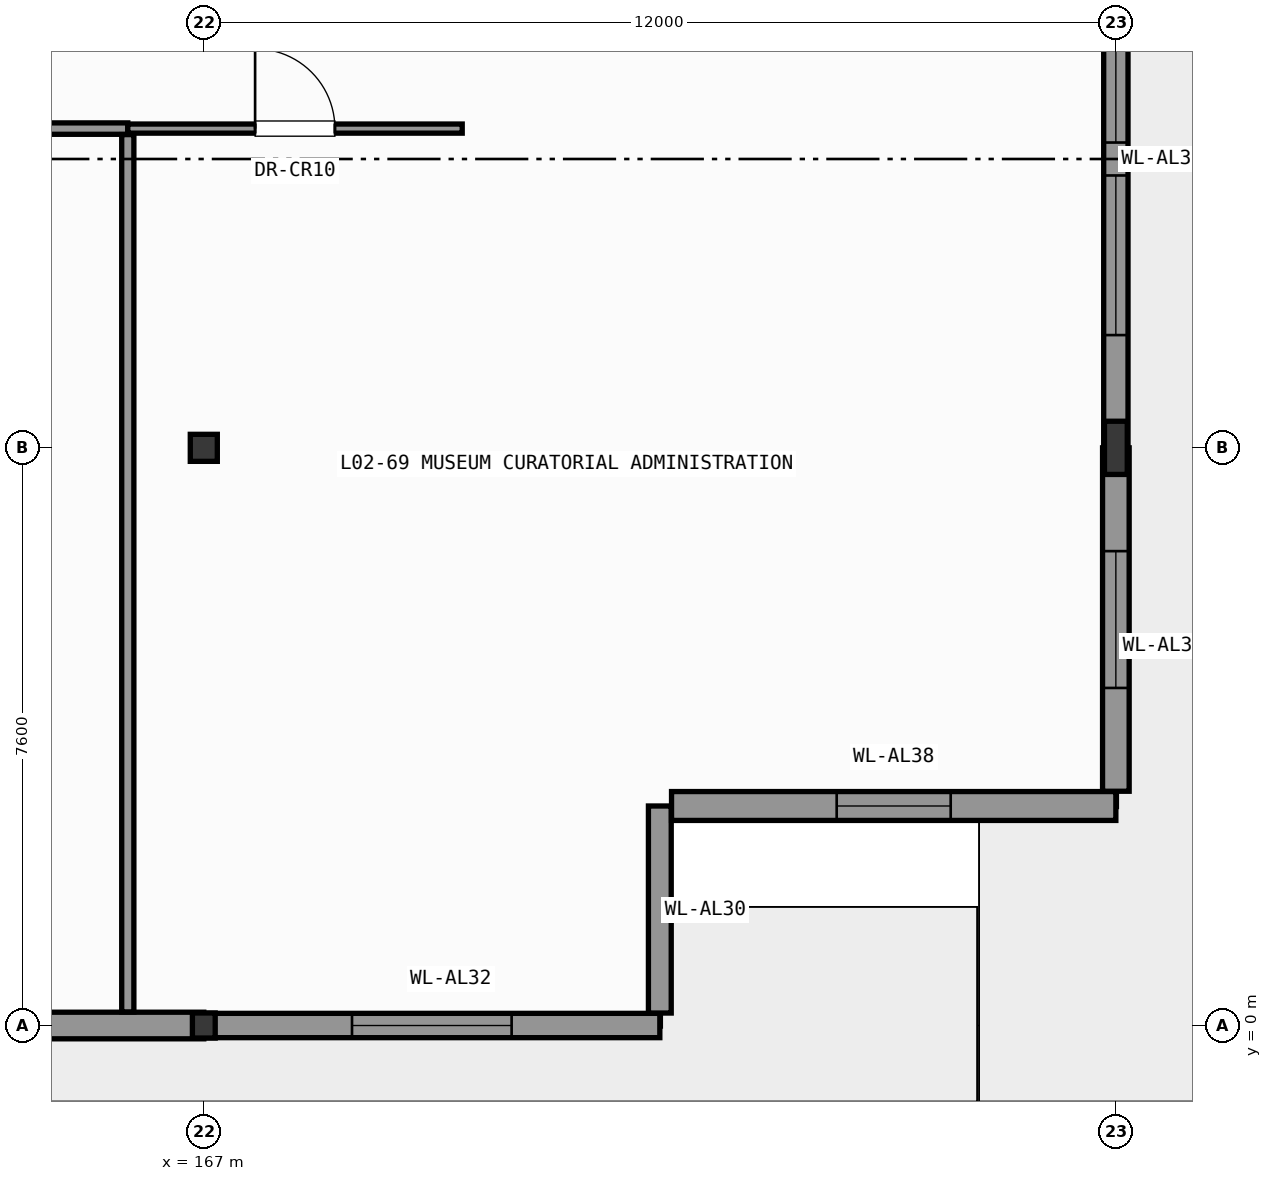
"""IFC4 building model, lengths in metres.
Left out: names, types, materials, properties, quantities, classifications, styles, units other than length and angle.
Written with IfcOpenShell. Run it as: python <this file> out.ifc"""

import sys

from ifc_helpers import new_model, si_unit, direction, frame, frame_2d, origin, origin_2d, place, context, subcontext, project, spatial, rectangle, hollow_circle, i_section, extrude, element, fill, save


model = new_model("IFC4")
c1 = context("Model", 3, precision=1e-05, world=origin(), true_north=direction((0.0, 1.0)))
c2 = subcontext(c1, "Body", "Model", "MODEL_VIEW")
j1 = project(units=[si_unit("LENGTHUNIT", "METRE"), si_unit("PLANEANGLEUNIT", "RADIAN")], contexts=[c1])
p1 = place(None, origin())
s1 = spatial("IfcSite", under=j1, at=p1, CompositionType="ELEMENT")
p2 = place(p1, origin())
s2 = spatial("IfcBuilding", under=s1, at=p2, CompositionType="ELEMENT")
p3 = place(p2, frame((0.0, 0.0, 7.8)))
s3 = spatial("IfcBuildingStorey", under=s2, at=p3, CompositionType="ELEMENT", Elevation=7.8)
p4 = place(p3, frame((167.0, 0.0, 0.0), z_axis=(0.0, 0.0, 1.0), x_axis=(1.0, 0.0, 0.0)))
e1 = element("IfcColumn", 1, at=p4, inside=s3, PredefinedType="COLUMN", context=c2, shape_type="SweptSolid", body=[
    extrude(i_section(OverallWidth=0.3, OverallDepth=0.33, WebThickness=0.01, FlangeThickness=0.017, FilletRadius=0.027, at=origin_2d()), origin(), (0.0, 0.0, 1.0), 5.4),
])
p5 = place(p3, frame((167.0, 7.6, 0.0), z_axis=(0.0, 0.0, 1.0), x_axis=(1.0, 0.0, 0.0)))
e2 = element("IfcColumn", 2, at=p5, inside=s3, PredefinedType="COLUMN", context=c2, shape_type="SweptSolid", body=[
    extrude(hollow_circle(Radius=0.178, WallThickness=0.016, at=origin_2d()), origin(), (0.0, 0.0, 1.0), 5.4),
])
p6 = place(p3, frame((179.0, 7.6, 0.0), z_axis=(0.0, 0.0, 1.0), x_axis=(1.0, 0.0, 0.0)))
e3 = element("IfcColumn", 3, at=p6, inside=s3, PredefinedType="COLUMN", context=c2, shape_type="SweptSolid", body=[
    extrude(i_section(OverallWidth=0.3, OverallDepth=0.7, WebThickness=0.017, FlangeThickness=0.032, FilletRadius=0.027, at=origin_2d()), origin(), (0.0, 0.0, 1.0), 5.4),
])
p7 = place(p3, frame((167.0, 0.0, 0.0), z_axis=(0.0, 0.0, 1.0), x_axis=(-1.0, 0.0, 0.0)))
e4 = element("IfcWall", 4, at=p7, inside=s3, PredefinedType="SOLIDWALL", context=c2, shape_type="SweptSolid", body=[
    extrude(rectangle(XDim=12.0, YDim=0.35, at=frame_2d((6.0, 0.0))), origin(), (0.0, 0.0, 1.0), 4.535),
])
p8 = place(p7, frame((3.225, 0.0, 0.95)))
e5 = element("IfcOpeningElement", 5, at=p8, cuts=e4, PredefinedType="OPENING", context=c2, shape_type="SweptSolid", body=[
    extrude(rectangle(XDim=1.55, YDim=2.1, at=frame_2d((0.775, 1.05))), frame((0.0, 0.185, 0.0), z_axis=(0.0, -1.0, 0.0), x_axis=(1.0, 0.0, 0.0)), (0.0, 0.0, 1.0), 0.37),
])
p9 = place(p7, frame((7.225, 0.0, 0.95)))
e6 = element("IfcOpeningElement", 6, at=p9, cuts=e4, PredefinedType="OPENING", context=c2, shape_type="SweptSolid", body=[
    extrude(rectangle(XDim=1.55, YDim=2.1, at=frame_2d((0.775, 1.05))), frame((0.0, 0.185, 0.0), z_axis=(0.0, -1.0, 0.0), x_axis=(1.0, 0.0, 0.0)), (0.0, 0.0, 1.0), 0.37),
])
p10 = place(p3, frame((173.0, 0.0, 0.0), z_axis=(0.0, 0.0, 1.0), x_axis=(-1.0, 0.0, 0.0)))
e7 = element("IfcWall", 7, at=p10, inside=s3, PredefinedType="SOLIDWALL", context=c2, shape_type="SweptSolid", body=[
    extrude(rectangle(XDim=6.0, YDim=0.32, at=frame_2d((3.0, 0.0))), origin(), (0.0, 0.0, 1.0), 5.15),
])
p11 = place(p10, frame((1.95, 0.0, 0.95)))
e8 = element("IfcOpeningElement", 8, at=p11, cuts=e7, PredefinedType="OPENING", context=c2, shape_type="SweptSolid", body=[
    extrude(rectangle(XDim=2.1, YDim=2.8, at=frame_2d((1.05, 1.4))), frame((0.0, 0.17, 0.0), z_axis=(0.0, -1.0, 0.0), x_axis=(1.0, 0.0, 0.0)), (0.0, 0.0, 1.0), 0.34),
])
p12 = place(p3, frame((173.0, 2.888, 0.0), z_axis=(0.0, 0.0, 1.0), x_axis=(0.0, -1.0, 0.0)))
e9 = element("IfcWall", 9, at=p12, inside=s3, PredefinedType="SOLIDWALL", context=c2, shape_type="SweptSolid", body=[
    extrude(rectangle(XDim=2.724, YDim=0.3, at=frame_2d((1.362, 0.0))), origin(), (0.0, 0.0, 1.0), 5.15),
])
p13 = place(p3, frame((179.0, 2.888, 0.0), z_axis=(0.0, 0.0, 1.0), x_axis=(-1.0, 0.0, 0.0)))
e10 = element("IfcWall", 10, at=p13, inside=s3, PredefinedType="SOLIDWALL", context=c2, shape_type="SweptSolid", body=[
    extrude(rectangle(XDim=5.846, YDim=0.38, at=frame_2d((2.923, 0.0))), origin(), (0.0, 0.0, 1.0), 5.15),
])
p14 = place(p13, frame((2.173, 0.0, 0.95)))
e11 = element("IfcOpeningElement", 11, at=p14, cuts=e10, PredefinedType="OPENING", context=c2, shape_type="SweptSolid", body=[
    extrude(rectangle(XDim=1.5, YDim=2.4, at=frame_2d((0.75, 1.2))), frame((0.0, 0.2, 0.0), z_axis=(0.0, -1.0, 0.0), x_axis=(1.0, 0.0, 0.0)), (0.0, 0.0, 1.0), 0.4),
])
p15 = place(p3, frame((179.0, 7.6, 0.0), z_axis=(0.0, 0.0, 1.0), x_axis=(0.0, -1.0, 0.0)))
e12 = element("IfcWall", 12, at=p15, inside=s3, PredefinedType="SOLIDWALL", context=c2, shape_type="SweptSolid", body=[
    extrude(rectangle(XDim=4.518, YDim=0.35, at=frame_2d((2.259, 0.0))), origin(), (0.0, 0.0, 1.0), 5.15),
])
p16 = place(p15, frame((1.359, 0.0, 0.95)))
e13 = element("IfcOpeningElement", 13, at=p16, cuts=e12, PredefinedType="OPENING", context=c2, shape_type="SweptSolid", body=[
    extrude(rectangle(XDim=1.8, YDim=2.6, at=frame_2d((0.9, 1.3))), frame((0.0, 0.185, 0.0), z_axis=(0.0, -1.0, 0.0), x_axis=(1.0, 0.0, 0.0)), (0.0, 0.0, 1.0), 0.37),
])
p17 = place(p3, frame((179.0, 15.2, 0.0), z_axis=(0.0, 0.0, 1.0), x_axis=(0.0, -1.0, 0.0)))
e14 = element("IfcWall", 14, at=p17, inside=s3, PredefinedType="SOLIDWALL", context=c2, shape_type="SweptSolid", body=[
    extrude(rectangle(XDim=7.6, YDim=0.32, at=frame_2d((3.8, 0.0))), origin(), (0.0, 0.0, 1.0), 4.635),
])
p18 = place(p17, frame((1.483, 0.0, 0.95)))
e15 = element("IfcOpeningElement", 15, at=p18, cuts=e14, PredefinedType="OPENING", context=c2, shape_type="SweptSolid", body=[
    extrude(rectangle(XDim=2.1, YDim=2.8, at=frame_2d((1.05, 1.4))), frame((0.0, 0.17, 0.0), z_axis=(0.0, -1.0, 0.0), x_axis=(1.0, 0.0, 0.0)), (0.0, 0.0, 1.0), 0.34),
])
p19 = place(p17, frame((4.017, 0.0, 0.95)))
e16 = element("IfcOpeningElement", 16, at=p19, cuts=e14, PredefinedType="OPENING", context=c2, shape_type="SweptSolid", body=[
    extrude(rectangle(XDim=2.1, YDim=2.8, at=frame_2d((1.05, 1.4))), frame((0.0, 0.17, 0.0), z_axis=(0.0, -1.0, 0.0), x_axis=(1.0, 0.0, 0.0)), (0.0, 0.0, 1.0), 0.34),
])
p20 = place(p3, frame((147.864, 11.8, 0.0), z_axis=(0.0, 0.0, 1.0), x_axis=(1.0, 0.0, 0.0)))
e17 = element("IfcWall", 17, at=p20, inside=s3, PredefinedType="PARTITIONING", context=c2, shape_type="SweptSolid", body=[
    extrude(rectangle(XDim=18.136, YDim=0.15, at=frame_2d((9.068, 0.0))), origin(), (0.0, 0.0, 1.0), 5.15),
])
p21 = place(p20, frame((8.343, 0.0, 0.0)))
e18 = element("IfcOpeningElement", 18, at=p21, cuts=e17, PredefinedType="OPENING", context=c2, shape_type="SweptSolid", body=[
    extrude(rectangle(XDim=1.45, YDim=2.35, at=frame_2d((0.725, 1.175))), frame((0.0, 0.085, 0.0), z_axis=(0.0, -1.0, 0.0), x_axis=(1.0, 0.0, 0.0)), (0.0, 0.0, 1.0), 0.17),
])
p22 = place(p3, frame((166.0, 11.8, 0.0), z_axis=(0.0, 0.0, 1.0), x_axis=(1.0, 0.0, 0.0)))
e19 = element("IfcWall", 19, at=p22, inside=s3, PredefinedType="PARTITIONING", context=c2, shape_type="SweptSolid", body=[
    extrude(rectangle(XDim=4.4, YDim=0.12, at=frame_2d((2.2, 0.0))), origin(), (0.0, 0.0, 1.0), 5.15),
])
p23 = place(p22, frame((1.675, 0.0, 0.0)))
e20 = element("IfcOpeningElement", 20, at=p23, cuts=e19, PredefinedType="OPENING", context=c2, shape_type="SweptSolid", body=[
    extrude(rectangle(XDim=1.05, YDim=2.2, at=frame_2d((0.525, 1.1))), frame((0.0, 0.07, 0.0), z_axis=(0.0, -1.0, 0.0), x_axis=(1.0, 0.0, 0.0)), (0.0, 0.0, 1.0), 0.14),
])
p24 = place(p3, frame((166.0, 0.179, 0.0), z_axis=(0.0, 0.0, 1.0), x_axis=(0.0, 1.0, 0.0)))
e21 = element("IfcWall", 21, at=p24, inside=s3, PredefinedType="PARTITIONING", context=c2, shape_type="SweptSolid", body=[
    extrude(rectangle(XDim=11.542, YDim=0.16, at=frame_2d((5.771, 0.0))), origin(), (0.0, 0.0, 1.0), 5.15),
])
p25 = place(p11, origin())
e22 = element("IfcWindow", 22, at=p25, inside=s3, PartitioningType="SINGLE_PANEL", PredefinedType="WINDOW", context=c2, shape_type="SweptSolid", body=[
    extrude(rectangle(XDim=2.1, YDim=2.8, at=frame_2d((1.05, 1.4))), frame((0.0, 0.03, 0.0), z_axis=(0.0, -1.0, 0.0), x_axis=(1.0, 0.0, 0.0)), (0.0, 0.0, 1.0), 0.06),
])
fill(e8, e22)
p26 = place(p14, origin())
e23 = element("IfcWindow", 23, at=p26, inside=s3, PartitioningType="SINGLE_PANEL", PredefinedType="WINDOW", context=c2, shape_type="SweptSolid", body=[
    extrude(rectangle(XDim=1.5, YDim=2.4, at=frame_2d((0.75, 1.2))), frame((0.0, 0.03, 0.0), z_axis=(0.0, -1.0, 0.0), x_axis=(1.0, 0.0, 0.0)), (0.0, 0.0, 1.0), 0.06),
])
fill(e11, e23)
p27 = place(p16, origin())
e24 = element("IfcWindow", 24, at=p27, inside=s3, PartitioningType="SINGLE_PANEL", PredefinedType="WINDOW", context=c2, shape_type="SweptSolid", body=[
    extrude(rectangle(XDim=1.8, YDim=2.6, at=frame_2d((0.9, 1.3))), frame((0.0, 0.03, 0.0), z_axis=(0.0, -1.0, 0.0), x_axis=(1.0, 0.0, 0.0)), (0.0, 0.0, 1.0), 0.06),
])
fill(e13, e24)
p28 = place(p18, origin())
e25 = element("IfcWindow", 25, at=p28, inside=s3, PartitioningType="SINGLE_PANEL", PredefinedType="WINDOW", context=c2, shape_type="SweptSolid", body=[
    extrude(rectangle(XDim=2.1, YDim=2.8, at=frame_2d((1.05, 1.4))), frame((0.0, 0.03, 0.0), z_axis=(0.0, -1.0, 0.0), x_axis=(1.0, 0.0, 0.0)), (0.0, 0.0, 1.0), 0.06),
])
fill(e15, e25)
p29 = place(p19, origin())
e26 = element("IfcWindow", 26, at=p29, inside=s3, PartitioningType="SINGLE_PANEL", PredefinedType="WINDOW", context=c2, shape_type="SweptSolid", body=[
    extrude(rectangle(XDim=2.1, YDim=2.8, at=frame_2d((1.05, 1.4))), frame((0.0, 0.03, 0.0), z_axis=(0.0, -1.0, 0.0), x_axis=(1.0, 0.0, 0.0)), (0.0, 0.0, 1.0), 0.06),
])
fill(e16, e26)
p30 = place(p23, origin())
e27 = element("IfcDoor", 27, at=p30, inside=s3, OperationType="SINGLE_SWING_LEFT", PredefinedType="DOOR", context=c2, shape_type="SweptSolid", body=[
    extrude(rectangle(XDim=1.05, YDim=2.2, at=frame_2d((0.525, 1.1))), frame((0.0, 0.025, 0.0), z_axis=(0.0, -1.0, 0.0), x_axis=(1.0, 0.0, 0.0)), (0.0, 0.0, 1.0), 0.05),
])
fill(e20, e27)
save(model, sys.argv[1])
